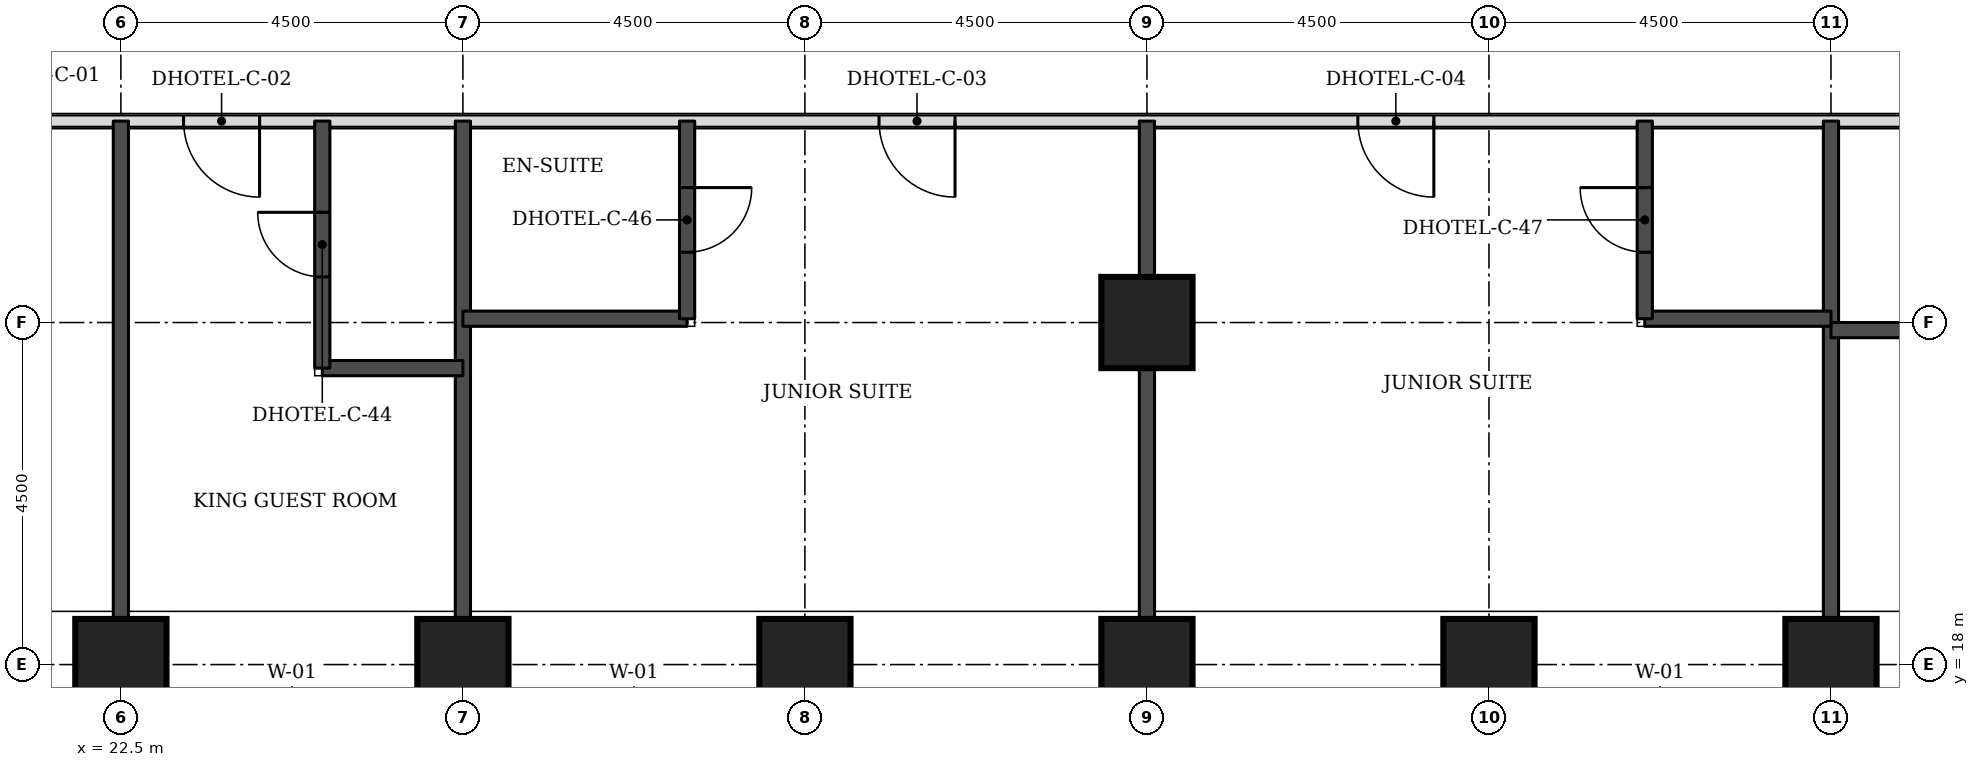
"""IFC4 building model, lengths in metres.
Left out: names, types, materials, properties, quantities, classifications, styles, units other than length and angle.
Written with IfcOpenShell. Run it as: python <this file> out.ifc"""

import sys

from ifc_helpers import new_model, si_unit, direction, frame, frame_2d, origin, origin_2d, place, context, subcontext, project, spatial, rectangle, extrude, element, fill, save


model = new_model("IFC4")
c1 = context("Model", 3, precision=1e-05, world=origin(), true_north=direction((0.0, 1.0)))
c2 = subcontext(c1, "Body", "Model", "MODEL_VIEW")
j1 = project(units=[si_unit("LENGTHUNIT", "METRE"), si_unit("PLANEANGLEUNIT", "RADIAN")], contexts=[c1])
p1 = place(None, origin())
s1 = spatial("IfcSite", under=j1, at=p1, CompositionType="ELEMENT")
p2 = place(p1, origin())
s2 = spatial("IfcBuilding", under=s1, at=p2, CompositionType="ELEMENT")
p3 = place(p2, frame((0.0, 0.0, 56.1)))
s3 = spatial("IfcBuildingStorey", under=s2, at=p3, CompositionType="ELEMENT", Elevation=56.1)
for number, where, z_axis, x_axis in (
    (1, (22.5, 18.0, 0.0), (0.0, 0.0, 1.0), (1.0, 0.0, 0.0)),
    (2, (27.0, 18.0, 0.0), (0.0, 0.0, 1.0), (1.0, 0.0, 0.0)),
    (3, (31.5, 18.0, 0.0), (0.0, 0.0, 1.0), (1.0, 0.0, 0.0)),
    (4, (36.0, 18.0, 0.0), (0.0, 0.0, 1.0), (1.0, 0.0, 0.0)),
    (5, (40.5, 18.0, 0.0), (0.0, 0.0, 1.0), (1.0, 0.0, 0.0)),
    (6, (45.0, 18.0, 0.0), (0.0, 0.0, 1.0), (1.0, 0.0, 0.0)),
    (7, (36.0, 22.5, 0.0), (0.0, 0.0, 1.0), (1.0, 0.0, 0.0)),
):
    element("IfcColumn", number, at=place(p3, frame(where, z_axis=z_axis, x_axis=x_axis)), inside=s3, PredefinedType="COLUMN", context=c2, shape_type="SweptSolid", body=[
        extrude(rectangle(XDim=1.2, YDim=1.2, at=origin_2d()), origin(), (0.0, 0.0, 1.0), 3.3),
    ])
p4 = place(p3, frame((19.15, 25.15, 0.0), z_axis=(0.0, 0.0, 1.0), x_axis=(1.0, 0.0, 0.0)))
e8 = element("IfcWall", 8, at=p4, inside=s3, PredefinedType="PARTITIONING", context=c2, shape_type="SweptSolid", body=[
    extrude(rectangle(XDim=33.7, YDim=0.15, at=frame_2d((16.85, 0.0))), origin(), (0.0, 0.0, 1.0), 3.08),
])
p5 = place(p4, frame((4.175, 0.0, 0.0)))
e9 = element("IfcOpeningElement", 9, at=p5, cuts=e8, PredefinedType="OPENING", context=c2, shape_type="SweptSolid", body=[
    extrude(rectangle(XDim=1.0, YDim=2.1, at=frame_2d((0.5, 1.05))), frame((0.0, 0.085, 0.0), z_axis=(0.0, -1.0, 0.0), x_axis=(1.0, 0.0, 0.0)), (0.0, 0.0, 1.0), 0.17),
])
p6 = place(p4, frame((13.325, 0.0, 0.0)))
e10 = element("IfcOpeningElement", 10, at=p6, cuts=e8, PredefinedType="OPENING", context=c2, shape_type="SweptSolid", body=[
    extrude(rectangle(XDim=1.0, YDim=2.1, at=frame_2d((0.5, 1.05))), frame((0.0, 0.085, 0.0), z_axis=(0.0, -1.0, 0.0), x_axis=(1.0, 0.0, 0.0)), (0.0, 0.0, 1.0), 0.17),
])
p7 = place(p4, frame((19.625, 0.0, 0.0)))
e11 = element("IfcOpeningElement", 11, at=p7, cuts=e8, PredefinedType="OPENING", context=c2, shape_type="SweptSolid", body=[
    extrude(rectangle(XDim=1.0, YDim=2.1, at=frame_2d((0.5, 1.05))), frame((0.0, 0.085, 0.0), z_axis=(0.0, -1.0, 0.0), x_axis=(1.0, 0.0, 0.0)), (0.0, 0.0, 1.0), 0.17),
])
p8 = place(p4, frame((28.775, 0.0, 0.0)))
e12 = element("IfcOpeningElement", 12, at=p8, cuts=e8, PredefinedType="OPENING", context=c2, shape_type="SweptSolid", body=[
    extrude(rectangle(XDim=1.0, YDim=2.1, at=frame_2d((0.5, 1.05))), frame((0.0, 0.085, 0.0), z_axis=(0.0, -1.0, 0.0), x_axis=(1.0, 0.0, 0.0)), (0.0, 0.0, 1.0), 0.17),
])
p9 = place(p4, frame((1.175, 0.0, 0.0)))
e13 = element("IfcOpeningElement", 13, at=p9, cuts=e8, PredefinedType="OPENING", context=c2, shape_type="SweptSolid", body=[
    extrude(rectangle(XDim=1.0, YDim=2.1, at=frame_2d((0.5, 1.05))), frame((0.0, 0.085, 0.0), z_axis=(0.0, -1.0, 0.0), x_axis=(1.0, 0.0, 0.0)), (0.0, 0.0, 1.0), 0.17),
])
p10 = place(p4, frame((31.525, 0.0, 0.0)))
e14 = element("IfcOpeningElement", 14, at=p10, cuts=e8, PredefinedType="OPENING", context=c2, shape_type="SweptSolid", body=[
    extrude(rectangle(XDim=1.0, YDim=2.1, at=frame_2d((0.5, 1.05))), frame((0.0, 0.085, 0.0), z_axis=(0.0, -1.0, 0.0), x_axis=(1.0, 0.0, 0.0)), (0.0, 0.0, 1.0), 0.17),
])
for number, where, z_axis, x_axis in (
    (15, (22.5, 18.6, 0.0), (0.0, 0.0, 1.0), (0.0, 1.0, 0.0)),
    (16, (27.0, 18.6, 0.0), (0.0, 0.0, 1.0), (0.0, 1.0, 0.0)),
    (17, (36.0, 18.6, 0.0), (0.0, 0.0, 1.0), (0.0, 1.0, 0.0)),
    (18, (45.0, 18.6, 0.0), (0.0, 0.0, 1.0), (0.0, 1.0, 0.0)),
):
    element("IfcWall", number, at=place(p3, frame(where, z_axis=z_axis, x_axis=x_axis)), inside=s3, PredefinedType="SOLIDWALL", context=c2, shape_type="SweptSolid", body=[
        extrude(rectangle(XDim=6.55, YDim=0.2, at=frame_2d((3.275, 0.0))), origin(), (0.0, 0.0, 1.0), 3.08),
    ])
p11 = place(p3, frame((25.15, 21.9, 0.0), z_axis=(0.0, 0.0, 1.0), x_axis=(1.0, 0.0, 0.0)))
e19 = element("IfcWall", 19, at=p11, inside=s3, PredefinedType="SOLIDWALL", context=c2, shape_type="SweptSolid", body=[
    extrude(rectangle(XDim=1.85, YDim=0.2, at=frame_2d((0.925, 0.0))), origin(), (0.0, 0.0, 1.0), 3.08),
])
p12 = place(p3, frame((25.15, 21.9, 0.0), z_axis=(0.0, 0.0, 1.0), x_axis=(0.0, 1.0, 0.0)))
e20 = element("IfcWall", 20, at=p12, inside=s3, PredefinedType="SOLIDWALL", context=c2, shape_type="SweptSolid", body=[
    extrude(rectangle(XDim=3.25, YDim=0.2, at=frame_2d((1.625, 0.0))), origin(), (0.0, 0.0, 1.0), 3.08),
])
p13 = place(p12, frame((1.2, 0.0, 0.0)))
e21 = element("IfcOpeningElement", 21, at=p13, cuts=e20, PredefinedType="OPENING", context=c2, shape_type="SweptSolid", body=[
    extrude(rectangle(XDim=0.85, YDim=2.1, at=frame_2d((0.425, 1.05))), frame((0.0, 0.11, 0.0), z_axis=(0.0, -1.0, 0.0), x_axis=(1.0, 0.0, 0.0)), (0.0, 0.0, 1.0), 0.22),
])
p14 = place(p3, frame((45.0, 22.4, 0.0), z_axis=(0.0, 0.0, 1.0), x_axis=(1.0, 0.0, 0.0)))
e22 = element("IfcWall", 22, at=p14, inside=s3, PredefinedType="SOLIDWALL", context=c2, shape_type="SweptSolid", body=[
    extrude(rectangle(XDim=2.35, YDim=0.2, at=frame_2d((1.175, 0.0))), origin(), (0.0, 0.0, 1.0), 3.08),
])
p15 = place(p3, frame((27.0, 22.55, 0.0), z_axis=(0.0, 0.0, 1.0), x_axis=(1.0, 0.0, 0.0)))
e23 = element("IfcWall", 23, at=p15, inside=s3, PredefinedType="SOLIDWALL", context=c2, shape_type="SweptSolid", body=[
    extrude(rectangle(XDim=2.95, YDim=0.2, at=frame_2d((1.475, 0.0))), origin(), (0.0, 0.0, 1.0), 3.08),
])
p16 = place(p3, frame((29.95, 22.55, 0.0), z_axis=(0.0, 0.0, 1.0), x_axis=(0.0, 1.0, 0.0)))
e24 = element("IfcWall", 24, at=p16, inside=s3, PredefinedType="SOLIDWALL", context=c2, shape_type="SweptSolid", body=[
    extrude(rectangle(XDim=2.6, YDim=0.2, at=frame_2d((1.3, 0.0))), origin(), (0.0, 0.0, 1.0), 3.08),
])
p17 = place(p16, frame((0.875, 0.0, 0.0)))
e25 = element("IfcOpeningElement", 25, at=p17, cuts=e24, PredefinedType="OPENING", context=c2, shape_type="SweptSolid", body=[
    extrude(rectangle(XDim=0.85, YDim=2.1, at=frame_2d((0.425, 1.05))), frame((0.0, 0.11, 0.0), z_axis=(0.0, -1.0, 0.0), x_axis=(1.0, 0.0, 0.0)), (0.0, 0.0, 1.0), 0.22),
])
p18 = place(p3, frame((42.55, 22.55, 0.0), z_axis=(0.0, 0.0, 1.0), x_axis=(1.0, 0.0, 0.0)))
e26 = element("IfcWall", 26, at=p18, inside=s3, PredefinedType="SOLIDWALL", context=c2, shape_type="SweptSolid", body=[
    extrude(rectangle(XDim=2.45, YDim=0.2, at=frame_2d((1.225, 0.0))), origin(), (0.0, 0.0, 1.0), 3.08),
])
p19 = place(p3, frame((42.55, 22.55, 0.0), z_axis=(0.0, 0.0, 1.0), x_axis=(0.0, 1.0, 0.0)))
e27 = element("IfcWall", 27, at=p19, inside=s3, PredefinedType="SOLIDWALL", context=c2, shape_type="SweptSolid", body=[
    extrude(rectangle(XDim=2.6, YDim=0.2, at=frame_2d((1.3, 0.0))), origin(), (0.0, 0.0, 1.0), 3.08),
])
p20 = place(p19, frame((0.875, 0.0, 0.0)))
e28 = element("IfcOpeningElement", 28, at=p20, cuts=e27, PredefinedType="OPENING", context=c2, shape_type="SweptSolid", body=[
    extrude(rectangle(XDim=0.85, YDim=2.1, at=frame_2d((0.425, 1.05))), frame((0.0, 0.11, 0.0), z_axis=(0.0, -1.0, 0.0), x_axis=(1.0, 0.0, 0.0)), (0.0, 0.0, 1.0), 0.22),
])
p21 = place(p5, frame((1.0, 0.0, 0.0), z_axis=(0.0, 0.0, 1.0), x_axis=(-1.0, 0.0, 0.0)))
e29 = element("IfcDoor", 29, at=p21, inside=s3, OperationType="SINGLE_SWING_LEFT", PredefinedType="DOOR", context=c2, shape_type="SweptSolid", body=[
    extrude(rectangle(XDim=1.0, YDim=2.1, at=frame_2d((0.5, 1.05))), frame((0.0, 0.025, 0.0), z_axis=(0.0, -1.0, 0.0), x_axis=(1.0, 0.0, 0.0)), (0.0, 0.0, 1.0), 0.05),
])
fill(e9, e29)
p22 = place(p13, origin())
e30 = element("IfcDoor", 30, at=p22, inside=s3, OperationType="SINGLE_SWING_RIGHT", PredefinedType="DOOR", context=c2, shape_type="SweptSolid", body=[
    extrude(rectangle(XDim=0.85, YDim=2.1, at=frame_2d((0.425, 1.05))), frame((0.0, 0.025, 0.0), z_axis=(0.0, -1.0, 0.0), x_axis=(1.0, 0.0, 0.0)), (0.0, 0.0, 1.0), 0.05),
])
fill(e21, e30)
p23 = place(p6, frame((1.0, 0.0, 0.0), z_axis=(0.0, 0.0, 1.0), x_axis=(-1.0, 0.0, 0.0)))
e31 = element("IfcDoor", 31, at=p23, inside=s3, OperationType="SINGLE_SWING_LEFT", PredefinedType="DOOR", context=c2, shape_type="SweptSolid", body=[
    extrude(rectangle(XDim=1.0, YDim=2.1, at=frame_2d((0.5, 1.05))), frame((0.0, 0.025, 0.0), z_axis=(0.0, -1.0, 0.0), x_axis=(1.0, 0.0, 0.0)), (0.0, 0.0, 1.0), 0.05),
])
fill(e10, e31)
p24 = place(p17, frame((0.85, 0.0, 0.0), z_axis=(0.0, 0.0, 1.0), x_axis=(-1.0, 0.0, 0.0)))
e32 = element("IfcDoor", 32, at=p24, inside=s3, OperationType="SINGLE_SWING_LEFT", PredefinedType="DOOR", context=c2, shape_type="SweptSolid", body=[
    extrude(rectangle(XDim=0.85, YDim=2.1, at=frame_2d((0.425, 1.05))), frame((0.0, 0.025, 0.0), z_axis=(0.0, -1.0, 0.0), x_axis=(1.0, 0.0, 0.0)), (0.0, 0.0, 1.0), 0.05),
])
fill(e25, e32)
p25 = place(p7, frame((1.0, 0.0, 0.0), z_axis=(0.0, 0.0, 1.0), x_axis=(-1.0, 0.0, 0.0)))
e33 = element("IfcDoor", 33, at=p25, inside=s3, OperationType="SINGLE_SWING_LEFT", PredefinedType="DOOR", context=c2, shape_type="SweptSolid", body=[
    extrude(rectangle(XDim=1.0, YDim=2.1, at=frame_2d((0.5, 1.05))), frame((0.0, 0.025, 0.0), z_axis=(0.0, -1.0, 0.0), x_axis=(1.0, 0.0, 0.0)), (0.0, 0.0, 1.0), 0.05),
])
fill(e11, e33)
p26 = place(p20, origin())
e34 = element("IfcDoor", 34, at=p26, inside=s3, OperationType="SINGLE_SWING_RIGHT", PredefinedType="DOOR", context=c2, shape_type="SweptSolid", body=[
    extrude(rectangle(XDim=0.85, YDim=2.1, at=frame_2d((0.425, 1.05))), frame((0.0, 0.025, 0.0), z_axis=(0.0, -1.0, 0.0), x_axis=(1.0, 0.0, 0.0)), (0.0, 0.0, 1.0), 0.05),
])
fill(e28, e34)
save(model, sys.argv[1])
